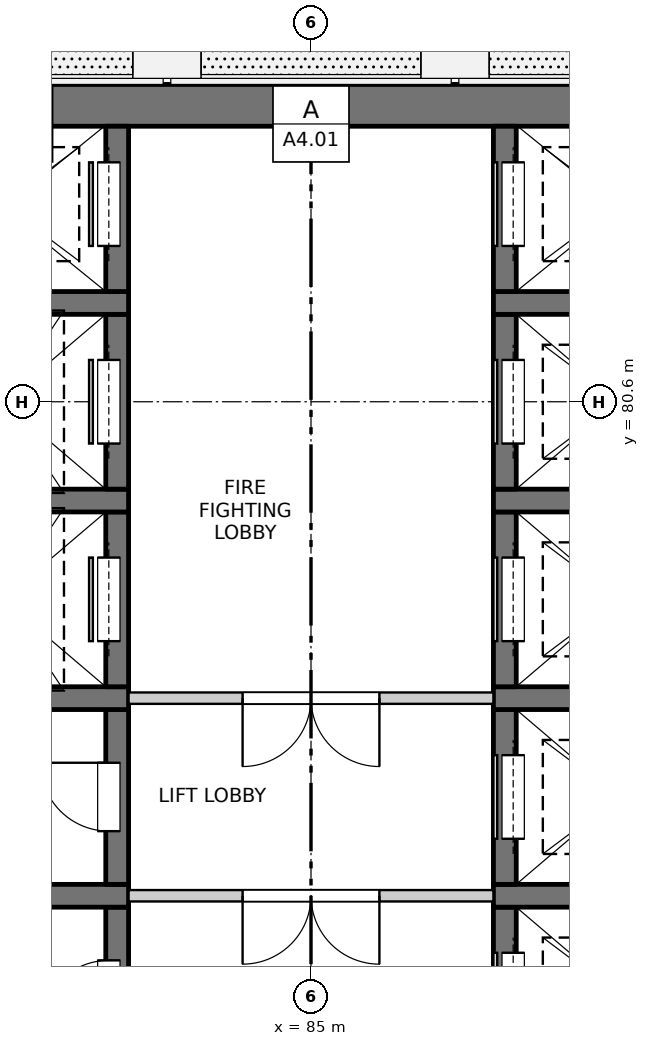
"""IFC4 building model, lengths in metres.
Left out: names, types, materials, properties, quantities, classifications, styles, units other than length and angle.
Written with IfcOpenShell. Run it as: python <this file> out.ifc"""

import sys

from ifc_helpers import new_model, si_unit, direction, frame, frame_2d, origin, place, context, subcontext, project, spatial, rectangle, extrude, element, fill, save


model = new_model("IFC4")
c1 = context("Model", 3, precision=1e-05, world=origin(), true_north=direction((0.0, 1.0)))
c2 = subcontext(c1, "Body", "Model", "MODEL_VIEW")
j1 = project(units=[si_unit("LENGTHUNIT", "METRE"), si_unit("PLANEANGLEUNIT", "RADIAN")], contexts=[c1])
p1 = place(None, origin())
s1 = spatial("IfcSite", under=j1, at=p1, CompositionType="ELEMENT")
p2 = place(p1, origin())
s2 = spatial("IfcBuilding", under=s1, at=p2, CompositionType="ELEMENT")
p3 = place(p2, frame((0.0, 0.0, 179.2)))
s3 = spatial("IfcBuildingStorey", under=s2, at=p3, CompositionType="ELEMENT", Elevation=179.2)
p4 = place(p3, frame((75.525, 84.5, -0.3), z_axis=(0.0, 0.0, 1.0), x_axis=(1.0, 0.0, 0.0)))
e1 = element("IfcWall", 1, at=p4, inside=s3, PredefinedType="SOLIDWALL", context=c2, shape_type="SweptSolid", body=[
    extrude(rectangle(XDim=18.95, YDim=0.55, at=frame_2d((9.475, 0.0))), origin(), (0.0, 0.0, 1.0), 3.45),
])
p5 = place(p3, frame((82.45, 71.65, -0.3), z_axis=(0.0, 0.0, 1.0), x_axis=(0.0, 1.0, 0.0)))
e2 = element("IfcWall", 2, at=p5, inside=s3, PredefinedType="SOLIDWALL", context=c2, shape_type="SweptSolid", body=[
    extrude(rectangle(XDim=2.3, YDim=0.3, at=frame_2d((1.15, 0.0))), origin(), (0.0, 0.0, 1.0), 3.45),
])
p6 = place(p5, frame((0.7, 0.0, 0.3)))
e3 = element("IfcOpeningElement", 3, at=p6, cuts=e2, PredefinedType="OPENING", context=c2, shape_type="SweptSolid", body=[
    extrude(rectangle(XDim=0.9, YDim=2.1, at=frame_2d((0.45, 1.05))), frame((0.0, 0.16, 0.0), z_axis=(0.0, -1.0, 0.0), x_axis=(1.0, 0.0, 0.0)), (0.0, 0.0, 1.0), 0.32),
])
p7 = place(p3, frame((79.6, 74.1, -0.3), z_axis=(0.0, 0.0, 1.0), x_axis=(1.0, 0.0, 0.0)))
e4 = element("IfcWall", 4, at=p7, inside=s3, PredefinedType="SOLIDWALL", context=c2, shape_type="SweptSolid", body=[
    extrude(rectangle(XDim=3.0, YDim=0.3, at=frame_2d((1.5, 0.0))), origin(), (0.0, 0.0, 1.0), 3.45),
])
p8 = place(p3, frame((82.45, 74.25, -0.3), z_axis=(0.0, 0.0, 1.0), x_axis=(0.0, 1.0, 0.0)))
e5 = element("IfcWall", 5, at=p8, inside=s3, PredefinedType="SOLIDWALL", context=c2, shape_type="SweptSolid", body=[
    extrude(rectangle(XDim=2.3, YDim=0.3, at=frame_2d((1.15, 0.0))), origin(), (0.0, 0.0, 1.0), 3.45),
])
p9 = place(p8, frame((0.7, 0.0, 0.3)))
e6 = element("IfcOpeningElement", 6, at=p9, cuts=e5, PredefinedType="OPENING", context=c2, shape_type="SweptSolid", body=[
    extrude(rectangle(XDim=0.9, YDim=2.1, at=frame_2d((0.45, 1.05))), frame((0.0, 0.16, 0.0), z_axis=(0.0, -1.0, 0.0), x_axis=(1.0, 0.0, 0.0)), (0.0, 0.0, 1.0), 0.32),
])
p10 = place(p3, frame((79.6, 76.7, -0.3), z_axis=(0.0, 0.0, 1.0), x_axis=(1.0, 0.0, 0.0)))
e7 = element("IfcWall", 7, at=p10, inside=s3, PredefinedType="SOLIDWALL", context=c2, shape_type="SweptSolid", body=[
    extrude(rectangle(XDim=3.0, YDim=0.3, at=frame_2d((1.5, 0.0))), origin(), (0.0, 0.0, 1.0), 3.45),
])
p11 = place(p3, frame((82.45, 76.85, -0.3), z_axis=(0.0, 0.0, 1.0), x_axis=(0.0, 1.0, 0.0)))
e8 = element("IfcWall", 8, at=p11, inside=s3, PredefinedType="SOLIDWALL", context=c2, shape_type="SweptSolid", body=[
    extrude(rectangle(XDim=2.3, YDim=0.3, at=frame_2d((1.15, 0.0))), origin(), (0.0, 0.0, 1.0), 3.45),
])
p12 = place(p11, frame((0.6, 0.0, 0.3)))
e9 = element("IfcOpeningElement", 9, at=p12, cuts=e8, PredefinedType="OPENING", context=c2, shape_type="SweptSolid", body=[
    extrude(rectangle(XDim=1.1, YDim=2.1, at=frame_2d((0.55, 1.05))), frame((0.0, 0.16, 0.0), z_axis=(0.0, -1.0, 0.0), x_axis=(1.0, 0.0, 0.0)), (0.0, 0.0, 1.0), 0.32),
])
p13 = place(p3, frame((79.6, 79.3, -0.3), z_axis=(0.0, 0.0, 1.0), x_axis=(1.0, 0.0, 0.0)))
e10 = element("IfcWall", 10, at=p13, inside=s3, PredefinedType="SOLIDWALL", context=c2, shape_type="SweptSolid", body=[
    extrude(rectangle(XDim=3.0, YDim=0.3, at=frame_2d((1.5, 0.0))), origin(), (0.0, 0.0, 1.0), 3.45),
])
p14 = place(p3, frame((82.45, 79.45, -0.3), z_axis=(0.0, 0.0, 1.0), x_axis=(0.0, 1.0, 0.0)))
e11 = element("IfcWall", 11, at=p14, inside=s3, PredefinedType="SOLIDWALL", context=c2, shape_type="SweptSolid", body=[
    extrude(rectangle(XDim=2.3, YDim=0.3, at=frame_2d((1.15, 0.0))), origin(), (0.0, 0.0, 1.0), 3.45),
])
p15 = place(p14, frame((0.6, 0.0, 0.3)))
e12 = element("IfcOpeningElement", 12, at=p15, cuts=e11, PredefinedType="OPENING", context=c2, shape_type="SweptSolid", body=[
    extrude(rectangle(XDim=1.1, YDim=2.1, at=frame_2d((0.55, 1.05))), frame((0.0, 0.16, 0.0), z_axis=(0.0, -1.0, 0.0), x_axis=(1.0, 0.0, 0.0)), (0.0, 0.0, 1.0), 0.32),
])
p16 = place(p3, frame((79.6, 81.9, -0.3), z_axis=(0.0, 0.0, 1.0), x_axis=(1.0, 0.0, 0.0)))
e13 = element("IfcWall", 13, at=p16, inside=s3, PredefinedType="SOLIDWALL", context=c2, shape_type="SweptSolid", body=[
    extrude(rectangle(XDim=3.0, YDim=0.3, at=frame_2d((1.5, 0.0))), origin(), (0.0, 0.0, 1.0), 3.45),
])
p17 = place(p3, frame((82.45, 82.05, -0.3), z_axis=(0.0, 0.0, 1.0), x_axis=(0.0, 1.0, 0.0)))
e14 = element("IfcWall", 14, at=p17, inside=s3, PredefinedType="SOLIDWALL", context=c2, shape_type="SweptSolid", body=[
    extrude(rectangle(XDim=2.175, YDim=0.3, at=frame_2d((1.087, 0.0))), origin(), (0.0, 0.0, 1.0), 3.45),
])
p18 = place(p17, frame((0.6, 0.0, 0.3)))
e15 = element("IfcOpeningElement", 15, at=p18, cuts=e14, PredefinedType="OPENING", context=c2, shape_type="SweptSolid", body=[
    extrude(rectangle(XDim=1.1, YDim=2.1, at=frame_2d((0.55, 1.05))), frame((0.0, 0.16, 0.0), z_axis=(0.0, -1.0, 0.0), x_axis=(1.0, 0.0, 0.0)), (0.0, 0.0, 1.0), 0.32),
])
p19 = place(p3, frame((87.55, 71.65, -0.3), z_axis=(0.0, 0.0, 1.0), x_axis=(0.0, 1.0, 0.0)))
e16 = element("IfcWall", 16, at=p19, inside=s3, PredefinedType="SOLIDWALL", context=c2, shape_type="SweptSolid", body=[
    extrude(rectangle(XDim=2.3, YDim=0.3, at=frame_2d((1.15, 0.0))), origin(), (0.0, 0.0, 1.0), 3.45),
])
p20 = place(p19, frame((0.6, 0.0, 0.3)))
e17 = element("IfcOpeningElement", 17, at=p20, cuts=e16, PredefinedType="OPENING", context=c2, shape_type="SweptSolid", body=[
    extrude(rectangle(XDim=1.1, YDim=2.1, at=frame_2d((0.55, 1.05))), frame((0.0, 0.16, 0.0), z_axis=(0.0, -1.0, 0.0), x_axis=(1.0, 0.0, 0.0)), (0.0, 0.0, 1.0), 0.32),
])
p21 = place(p3, frame((87.4, 74.1, -0.3), z_axis=(0.0, 0.0, 1.0), x_axis=(1.0, 0.0, 0.0)))
e18 = element("IfcWall", 18, at=p21, inside=s3, PredefinedType="SOLIDWALL", context=c2, shape_type="SweptSolid", body=[
    extrude(rectangle(XDim=3.0, YDim=0.3, at=frame_2d((1.5, 0.0))), origin(), (0.0, 0.0, 1.0), 3.45),
])
p22 = place(p3, frame((87.55, 74.25, -0.3), z_axis=(0.0, 0.0, 1.0), x_axis=(0.0, 1.0, 0.0)))
e19 = element("IfcWall", 19, at=p22, inside=s3, PredefinedType="SOLIDWALL", context=c2, shape_type="SweptSolid", body=[
    extrude(rectangle(XDim=2.3, YDim=0.3, at=frame_2d((1.15, 0.0))), origin(), (0.0, 0.0, 1.0), 3.45),
])
p23 = place(p22, frame((0.6, 0.0, 0.3)))
e20 = element("IfcOpeningElement", 20, at=p23, cuts=e19, PredefinedType="OPENING", context=c2, shape_type="SweptSolid", body=[
    extrude(rectangle(XDim=1.1, YDim=2.1, at=frame_2d((0.55, 1.05))), frame((0.0, 0.16, 0.0), z_axis=(0.0, -1.0, 0.0), x_axis=(1.0, 0.0, 0.0)), (0.0, 0.0, 1.0), 0.32),
])
p24 = place(p3, frame((87.4, 76.7, -0.3), z_axis=(0.0, 0.0, 1.0), x_axis=(1.0, 0.0, 0.0)))
e21 = element("IfcWall", 21, at=p24, inside=s3, PredefinedType="SOLIDWALL", context=c2, shape_type="SweptSolid", body=[
    extrude(rectangle(XDim=3.0, YDim=0.3, at=frame_2d((1.5, 0.0))), origin(), (0.0, 0.0, 1.0), 3.45),
])
p25 = place(p3, frame((87.55, 76.85, -0.3), z_axis=(0.0, 0.0, 1.0), x_axis=(0.0, 1.0, 0.0)))
e22 = element("IfcWall", 22, at=p25, inside=s3, PredefinedType="SOLIDWALL", context=c2, shape_type="SweptSolid", body=[
    extrude(rectangle(XDim=2.3, YDim=0.3, at=frame_2d((1.15, 0.0))), origin(), (0.0, 0.0, 1.0), 3.45),
])
p26 = place(p25, frame((0.6, 0.0, 0.3)))
e23 = element("IfcOpeningElement", 23, at=p26, cuts=e22, PredefinedType="OPENING", context=c2, shape_type="SweptSolid", body=[
    extrude(rectangle(XDim=1.1, YDim=2.1, at=frame_2d((0.55, 1.05))), frame((0.0, 0.16, 0.0), z_axis=(0.0, -1.0, 0.0), x_axis=(1.0, 0.0, 0.0)), (0.0, 0.0, 1.0), 0.32),
])
p27 = place(p3, frame((87.4, 79.3, -0.3), z_axis=(0.0, 0.0, 1.0), x_axis=(1.0, 0.0, 0.0)))
e24 = element("IfcWall", 24, at=p27, inside=s3, PredefinedType="SOLIDWALL", context=c2, shape_type="SweptSolid", body=[
    extrude(rectangle(XDim=3.0, YDim=0.3, at=frame_2d((1.5, 0.0))), origin(), (0.0, 0.0, 1.0), 3.45),
])
p28 = place(p3, frame((87.55, 79.45, -0.3), z_axis=(0.0, 0.0, 1.0), x_axis=(0.0, 1.0, 0.0)))
e25 = element("IfcWall", 25, at=p28, inside=s3, PredefinedType="SOLIDWALL", context=c2, shape_type="SweptSolid", body=[
    extrude(rectangle(XDim=2.3, YDim=0.3, at=frame_2d((1.15, 0.0))), origin(), (0.0, 0.0, 1.0), 3.45),
])
p29 = place(p28, frame((0.6, 0.0, 0.3)))
e26 = element("IfcOpeningElement", 26, at=p29, cuts=e25, PredefinedType="OPENING", context=c2, shape_type="SweptSolid", body=[
    extrude(rectangle(XDim=1.1, YDim=2.1, at=frame_2d((0.55, 1.05))), frame((0.0, 0.16, 0.0), z_axis=(0.0, -1.0, 0.0), x_axis=(1.0, 0.0, 0.0)), (0.0, 0.0, 1.0), 0.32),
])
p30 = place(p3, frame((87.4, 81.9, -0.3), z_axis=(0.0, 0.0, 1.0), x_axis=(1.0, 0.0, 0.0)))
e27 = element("IfcWall", 27, at=p30, inside=s3, PredefinedType="SOLIDWALL", context=c2, shape_type="SweptSolid", body=[
    extrude(rectangle(XDim=3.0, YDim=0.3, at=frame_2d((1.5, 0.0))), origin(), (0.0, 0.0, 1.0), 3.45),
])
p31 = place(p3, frame((87.55, 82.05, -0.3), z_axis=(0.0, 0.0, 1.0), x_axis=(0.0, 1.0, 0.0)))
e28 = element("IfcWall", 28, at=p31, inside=s3, PredefinedType="SOLIDWALL", context=c2, shape_type="SweptSolid", body=[
    extrude(rectangle(XDim=2.175, YDim=0.3, at=frame_2d((1.087, 0.0))), origin(), (0.0, 0.0, 1.0), 3.45),
])
p32 = place(p31, frame((0.6, 0.0, 0.3)))
e29 = element("IfcOpeningElement", 29, at=p32, cuts=e28, PredefinedType="OPENING", context=c2, shape_type="SweptSolid", body=[
    extrude(rectangle(XDim=1.1, YDim=2.1, at=frame_2d((0.55, 1.05))), frame((0.0, 0.16, 0.0), z_axis=(0.0, -1.0, 0.0), x_axis=(1.0, 0.0, 0.0)), (0.0, 0.0, 1.0), 0.32),
])
p33 = place(p3, frame((82.6, 74.1, 0.0), z_axis=(0.0, 0.0, 1.0), x_axis=(1.0, 0.0, 0.0)))
e30 = element("IfcWall", 30, at=p33, inside=s3, PredefinedType="PARTITIONING", context=c2, shape_type="SweptSolid", body=[
    extrude(rectangle(XDim=4.8, YDim=0.15, at=frame_2d((2.4, 0.0))), origin(), (0.0, 0.0, 1.0), 3.15),
])
p34 = place(p33, frame((1.5, 0.0, 0.0)))
e31 = element("IfcOpeningElement", 31, at=p34, cuts=e30, PredefinedType="OPENING", context=c2, shape_type="SweptSolid", body=[
    extrude(rectangle(XDim=1.8, YDim=2.1, at=frame_2d((0.9, 1.05))), frame((0.0, 0.085, 0.0), z_axis=(0.0, -1.0, 0.0), x_axis=(1.0, 0.0, 0.0)), (0.0, 0.0, 1.0), 0.17),
])
p35 = place(p3, frame((82.6, 76.7, 0.0), z_axis=(0.0, 0.0, 1.0), x_axis=(1.0, 0.0, 0.0)))
e32 = element("IfcWall", 32, at=p35, inside=s3, PredefinedType="PARTITIONING", context=c2, shape_type="SweptSolid", body=[
    extrude(rectangle(XDim=4.8, YDim=0.15, at=frame_2d((2.4, 0.0))), origin(), (0.0, 0.0, 1.0), 3.15),
])
p36 = place(p35, frame((1.5, 0.0, 0.0)))
e33 = element("IfcOpeningElement", 33, at=p36, cuts=e32, PredefinedType="OPENING", context=c2, shape_type="SweptSolid", body=[
    extrude(rectangle(XDim=1.8, YDim=2.1, at=frame_2d((0.9, 1.05))), frame((0.0, 0.085, 0.0), z_axis=(0.0, -1.0, 0.0), x_axis=(1.0, 0.0, 0.0)), (0.0, 0.0, 1.0), 0.17),
])
p37 = place(p6, origin())
e34 = element("IfcDoor", 34, at=p37, inside=s3, OperationType="SINGLE_SWING_LEFT", PredefinedType="DOOR", context=c2, shape_type="SweptSolid", body=[
    extrude(rectangle(XDim=0.9, YDim=2.1, at=frame_2d((0.45, 1.05))), frame((0.0, 0.135, 0.0), z_axis=(0.0, -1.0, 0.0), x_axis=(1.0, 0.0, 0.0)), (0.0, 0.0, 1.0), 0.05),
])
fill(e3, e34)
p38 = place(p20, origin())
e35 = element("IfcDoor", 35, at=p38, inside=s3, OperationType="SLIDING_TO_LEFT", PredefinedType="DOOR", context=c2, shape_type="SweptSolid", body=[
    extrude(rectangle(XDim=1.1, YDim=2.1, at=frame_2d((0.55, 1.05))), frame((0.0, -0.085, 0.0), z_axis=(0.0, -1.0, 0.0), x_axis=(1.0, 0.0, 0.0)), (0.0, 0.0, 1.0), 0.05),
])
fill(e17, e35)
p39 = place(p34, origin())
e36 = element("IfcDoor", 36, at=p39, inside=s3, OperationType="DOUBLE_DOOR_SINGLE_SWING", PredefinedType="DOOR", context=c2, shape_type="SweptSolid", body=[
    extrude(rectangle(XDim=1.8, YDim=2.1, at=frame_2d((0.9, 1.05))), frame((0.0, 0.025, 0.0), z_axis=(0.0, -1.0, 0.0), x_axis=(1.0, 0.0, 0.0)), (0.0, 0.0, 1.0), 0.05),
])
fill(e31, e36)
p40 = place(p9, origin())
e37 = element("IfcDoor", 37, at=p40, inside=s3, OperationType="SINGLE_SWING_RIGHT", PredefinedType="DOOR", context=c2, shape_type="SweptSolid", body=[
    extrude(rectangle(XDim=0.9, YDim=2.1, at=frame_2d((0.45, 1.05))), frame((0.0, 0.135, 0.0), z_axis=(0.0, -1.0, 0.0), x_axis=(1.0, 0.0, 0.0)), (0.0, 0.0, 1.0), 0.05),
])
fill(e6, e37)
p41 = place(p23, origin())
e38 = element("IfcDoor", 38, at=p41, inside=s3, OperationType="SLIDING_TO_LEFT", PredefinedType="DOOR", context=c2, shape_type="SweptSolid", body=[
    extrude(rectangle(XDim=1.1, YDim=2.1, at=frame_2d((0.55, 1.05))), frame((0.0, -0.085, 0.0), z_axis=(0.0, -1.0, 0.0), x_axis=(1.0, 0.0, 0.0)), (0.0, 0.0, 1.0), 0.05),
])
fill(e20, e38)
p42 = place(p36, origin())
e39 = element("IfcDoor", 39, at=p42, inside=s3, OperationType="DOUBLE_DOOR_SINGLE_SWING", PredefinedType="DOOR", context=c2, shape_type="SweptSolid", body=[
    extrude(rectangle(XDim=1.8, YDim=2.1, at=frame_2d((0.9, 1.05))), frame((0.0, 0.025, 0.0), z_axis=(0.0, -1.0, 0.0), x_axis=(1.0, 0.0, 0.0)), (0.0, 0.0, 1.0), 0.05),
])
fill(e33, e39)
p43 = place(p12, origin())
e40 = element("IfcDoor", 40, at=p43, inside=s3, OperationType="SLIDING_TO_LEFT", PredefinedType="DOOR", context=c2, shape_type="SweptSolid", body=[
    extrude(rectangle(XDim=1.1, YDim=2.1, at=frame_2d((0.55, 1.05))), frame((0.0, 0.135, 0.0), z_axis=(0.0, -1.0, 0.0), x_axis=(1.0, 0.0, 0.0)), (0.0, 0.0, 1.0), 0.05),
])
fill(e9, e40)
p44 = place(p26, origin())
e41 = element("IfcDoor", 41, at=p44, inside=s3, OperationType="SLIDING_TO_LEFT", PredefinedType="DOOR", context=c2, shape_type="SweptSolid", body=[
    extrude(rectangle(XDim=1.1, YDim=2.1, at=frame_2d((0.55, 1.05))), frame((0.0, -0.085, 0.0), z_axis=(0.0, -1.0, 0.0), x_axis=(1.0, 0.0, 0.0)), (0.0, 0.0, 1.0), 0.05),
])
fill(e23, e41)
p45 = place(p15, origin())
e42 = element("IfcDoor", 42, at=p45, inside=s3, OperationType="SLIDING_TO_LEFT", PredefinedType="DOOR", context=c2, shape_type="SweptSolid", body=[
    extrude(rectangle(XDim=1.1, YDim=2.1, at=frame_2d((0.55, 1.05))), frame((0.0, 0.135, 0.0), z_axis=(0.0, -1.0, 0.0), x_axis=(1.0, 0.0, 0.0)), (0.0, 0.0, 1.0), 0.05),
])
fill(e12, e42)
p46 = place(p29, origin())
e43 = element("IfcDoor", 43, at=p46, inside=s3, OperationType="SLIDING_TO_RIGHT", PredefinedType="DOOR", context=c2, shape_type="SweptSolid", body=[
    extrude(rectangle(XDim=1.1, YDim=2.1, at=frame_2d((0.55, 1.05))), frame((0.0, -0.085, 0.0), z_axis=(0.0, -1.0, 0.0), x_axis=(1.0, 0.0, 0.0)), (0.0, 0.0, 1.0), 0.05),
])
fill(e26, e43)
p47 = place(p18, origin())
e44 = element("IfcDoor", 44, at=p47, inside=s3, OperationType="SLIDING_TO_RIGHT", PredefinedType="DOOR", context=c2, shape_type="SweptSolid", body=[
    extrude(rectangle(XDim=1.1, YDim=2.1, at=frame_2d((0.55, 1.05))), frame((0.0, 0.135, 0.0), z_axis=(0.0, -1.0, 0.0), x_axis=(1.0, 0.0, 0.0)), (0.0, 0.0, 1.0), 0.05),
])
fill(e15, e44)
p48 = place(p32, origin())
e45 = element("IfcDoor", 45, at=p48, inside=s3, OperationType="SLIDING_TO_RIGHT", PredefinedType="DOOR", context=c2, shape_type="SweptSolid", body=[
    extrude(rectangle(XDim=1.1, YDim=2.1, at=frame_2d((0.55, 1.05))), frame((0.0, -0.085, 0.0), z_axis=(0.0, -1.0, 0.0), x_axis=(1.0, 0.0, 0.0)), (0.0, 0.0, 1.0), 0.05),
])
fill(e29, e45)
save(model, sys.argv[1])
